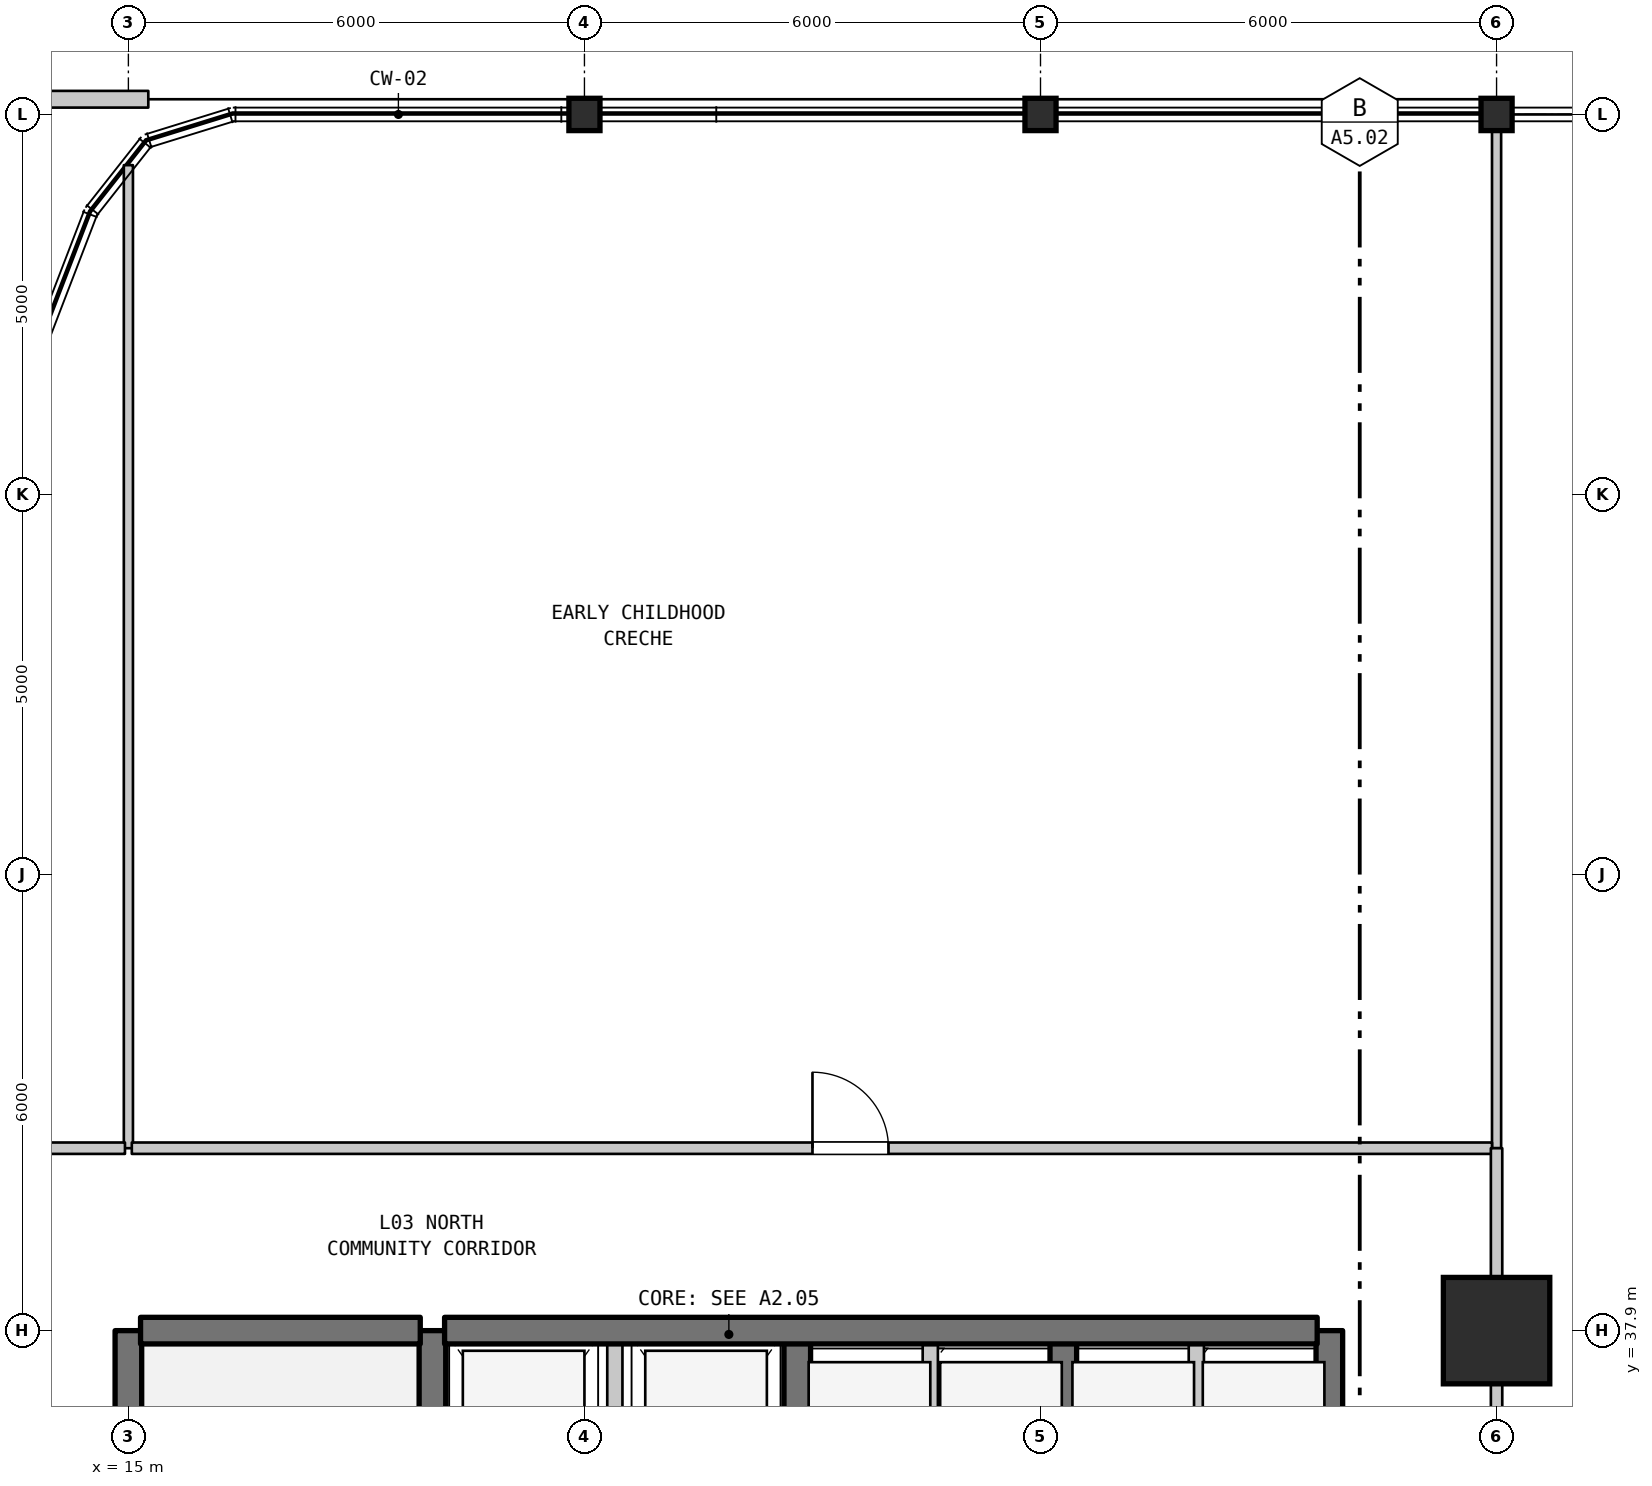
"""IFC4 building model, lengths in metres.
Left out: names, types, materials, properties, quantities, classifications, styles, units other than length and angle.
Written with IfcOpenShell. Run it as: python <this file> out.ifc"""

import sys

from ifc_helpers import new_model, si_unit, direction, frame, frame_2d, origin, origin_2d, place, context, subcontext, project, spatial, rectangle, i_section, extrude, element, fill, save


model = new_model("IFC4")
c1 = context("Model", 3, precision=1e-05, world=origin(), true_north=direction((0.0, 1.0)))
c2 = subcontext(c1, "Body", "Model", "MODEL_VIEW")
j1 = project(units=[si_unit("LENGTHUNIT", "METRE"), si_unit("PLANEANGLEUNIT", "RADIAN")], contexts=[c1])
p1 = place(None, origin())
s1 = spatial("IfcSite", under=j1, at=p1, CompositionType="ELEMENT")
p2 = place(p1, origin())
s2 = spatial("IfcBuilding", under=s1, at=p2, CompositionType="ELEMENT")
p3 = place(p2, frame((0.0, 0.0, 19.0)))
s3 = spatial("IfcBuildingStorey", under=s2, at=p3, CompositionType="ELEMENT", Elevation=19.0)
for number, where, z_axis, x_axis in (
    (1, (21.0, 53.9, 0.0), (0.0, 0.0, 1.0), (1.0, 0.0, 0.0)),
    (2, (27.0, 53.9, 0.0), (0.0, 0.0, 1.0), (1.0, 0.0, 0.0)),
):
    element("IfcColumn", number, at=place(p3, frame(where, z_axis=z_axis, x_axis=x_axis)), inside=s3, PredefinedType="COLUMN", context=c2, shape_type="SweptSolid", body=[
        extrude(i_section(OverallWidth=0.409, OverallDepth=0.425, WebThickness=0.032, FlangeThickness=0.052, FilletRadius=0.015, at=origin_2d()), origin(), (0.0, 0.0, 1.0), 5.0),
    ])
p4 = place(p3, frame((33.0, 37.9, 0.0), z_axis=(0.0, 0.0, 1.0), x_axis=(1.0, 0.0, 0.0)))
e3 = element("IfcColumn", 3, at=p4, inside=s3, PredefinedType="COLUMN", context=c2, shape_type="SweptSolid", body=[
    extrude(rectangle(XDim=1.4, YDim=1.4, at=origin_2d()), origin(), (0.0, 0.0, 1.0), 5.0),
])
p5 = place(p3, frame((33.0, 53.9, 0.0), z_axis=(0.0, 0.0, 1.0), x_axis=(1.0, 0.0, 0.0)))
e4 = element("IfcColumn", 4, at=p5, inside=s3, PredefinedType="COLUMN", context=c2, shape_type="SweptSolid", body=[
    extrude(i_section(OverallWidth=0.409, OverallDepth=0.425, WebThickness=0.032, FlangeThickness=0.052, FilletRadius=0.015, at=origin_2d()), origin(), (0.0, 0.0, 1.0), 5.0),
])
p6 = place(p3, frame((4.414, 54.1, 0.0), z_axis=(0.0, 0.0, 1.0), x_axis=(1.0, 0.0, 0.0)))
e5 = element("IfcWall", 5, at=p6, inside=s3, PredefinedType="PARAPET", context=c2, shape_type="SweptSolid", body=[
    extrude(rectangle(XDim=10.848, YDim=0.22, at=frame_2d((5.424, 0.0))), origin(), (0.0, 0.0, 1.0), 0.55),
])
p7 = place(p3, frame((15.0, 31.1, 0.0), z_axis=(0.0, 0.0, 1.0), x_axis=(0.0, 1.0, 0.0)))
e6 = element("IfcWall", 6, at=p7, inside=s3, PredefinedType="SHEAR", context=c2, shape_type="SweptSolid", body=[
    extrude(rectangle(XDim=6.8, YDim=0.35, at=frame_2d((3.4, 0.0))), origin(), (0.0, 0.0, 1.0), 4.685),
])
p8 = place(p3, frame((15.0, 40.3, 0.0), z_axis=(0.0, 0.0, 1.0), x_axis=(0.0, 1.0, 0.0)))
e7 = element("IfcWall", 7, at=p8, inside=s3, PredefinedType="PARTITIONING", context=c2, shape_type="SweptSolid", body=[
    extrude(rectangle(XDim=12.933, YDim=0.12, at=frame_2d((6.466, 0.0))), origin(), (0.0, 0.0, 1.0), 4.685),
])
p9 = place(p3, frame((19.0, 35.0, 0.0), z_axis=(0.0, 0.0, 1.0), x_axis=(0.0, 1.0, 0.0)))
e8 = element("IfcWall", 8, at=p9, inside=s3, PredefinedType="SHEAR", context=c2, shape_type="SweptSolid", body=[
    extrude(rectangle(XDim=2.9, YDim=0.35, at=frame_2d((1.45, 0.0))), origin(), (0.0, 0.0, 1.0), 4.685),
])
p10 = place(p3, frame((21.4, 35.0, 0.0), z_axis=(0.0, 0.0, 1.0), x_axis=(0.0, 1.0, 0.0)))
e9 = element("IfcWall", 9, at=p10, inside=s3, PredefinedType="STANDARD", context=c2, shape_type="SweptSolid", body=[
    extrude(rectangle(XDim=2.9, YDim=0.2, at=frame_2d((1.45, 0.0))), origin(), (0.0, 0.0, 1.0), 4.685),
])
p11 = place(p3, frame((23.8, 35.0, 0.0), z_axis=(0.0, 0.0, 1.0), x_axis=(0.0, 1.0, 0.0)))
e10 = element("IfcWall", 10, at=p11, inside=s3, PredefinedType="SHEAR", context=c2, shape_type="SweptSolid", body=[
    extrude(rectangle(XDim=2.9, YDim=0.35, at=frame_2d((1.45, 0.0))), origin(), (0.0, 0.0, 1.0), 4.685),
])
p12 = place(p3, frame((25.55, 35.0, 0.0), z_axis=(0.0, 0.0, 1.0), x_axis=(0.0, 1.0, 0.0)))
e11 = element("IfcWall", 11, at=p12, inside=s3, PredefinedType="STANDARD", context=c2, shape_type="SweptSolid", body=[
    extrude(rectangle(XDim=2.9, YDim=0.2, at=frame_2d((1.45, 0.0))), origin(), (0.0, 0.0, 1.0), 4.685),
])
p13 = place(p3, frame((27.3, 35.0, 0.0), z_axis=(0.0, 0.0, 1.0), x_axis=(0.0, 1.0, 0.0)))
e12 = element("IfcWall", 12, at=p13, inside=s3, PredefinedType="SHEAR", context=c2, shape_type="SweptSolid", body=[
    extrude(rectangle(XDim=2.9, YDim=0.35, at=frame_2d((1.45, 0.0))), origin(), (0.0, 0.0, 1.0), 4.685),
])
p14 = place(p3, frame((29.05, 35.0, 0.0), z_axis=(0.0, 0.0, 1.0), x_axis=(0.0, 1.0, 0.0)))
e13 = element("IfcWall", 13, at=p14, inside=s3, PredefinedType="STANDARD", context=c2, shape_type="SweptSolid", body=[
    extrude(rectangle(XDim=2.9, YDim=0.2, at=frame_2d((1.45, 0.0))), origin(), (0.0, 0.0, 1.0), 4.685),
])
p15 = place(p3, frame((30.8, 35.0, 0.0), z_axis=(0.0, 0.0, 1.0), x_axis=(0.0, 1.0, 0.0)))
e14 = element("IfcWall", 14, at=p15, inside=s3, PredefinedType="SHEAR", context=c2, shape_type="SweptSolid", body=[
    extrude(rectangle(XDim=2.9, YDim=0.35, at=frame_2d((1.45, 0.0))), origin(), (0.0, 0.0, 1.0), 4.685),
])
p16 = place(p3, frame((33.0, 27.9, 0.0), z_axis=(0.0, 0.0, 1.0), x_axis=(0.0, 1.0, 0.0)))
e15 = element("IfcWall", 15, at=p16, inside=s3, PredefinedType="STANDARD", context=c2, shape_type="SweptSolid", body=[
    extrude(rectangle(XDim=10.0, YDim=0.15, at=frame_2d((5.0, 0.0))), origin(), (0.0, 0.0, 1.0), 4.185),
])
p17 = place(p3, frame((33.0, 40.3, 0.0), z_axis=(0.0, 0.0, 1.0), x_axis=(0.0, 1.0, 0.0)))
e16 = element("IfcWall", 16, at=p17, inside=s3, PredefinedType="PARTITIONING", context=c2, shape_type="SweptSolid", body=[
    extrude(rectangle(XDim=13.59, YDim=0.12, at=frame_2d((6.795, 0.0))), origin(), (0.0, 0.0, 1.0), 4.085),
])
p18 = place(p3, frame((15.16, 37.9, 0.0), z_axis=(0.0, 0.0, 1.0), x_axis=(1.0, 0.0, 0.0)))
e17 = element("IfcWall", 17, at=p18, inside=s3, PredefinedType="SHEAR", context=c2, shape_type="SweptSolid", body=[
    extrude(rectangle(XDim=3.68, YDim=0.35, at=frame_2d((1.84, 0.0))), origin(), (0.0, 0.0, 1.0), 4.685),
])
p19 = place(p3, frame((19.16, 37.9, 0.0), z_axis=(0.0, 0.0, 1.0), x_axis=(1.0, 0.0, 0.0)))
e18 = element("IfcWall", 18, at=p19, inside=s3, PredefinedType="SHEAR", context=c2, shape_type="SweptSolid", body=[
    extrude(rectangle(XDim=11.48, YDim=0.35, at=frame_2d((5.74, 0.0))), origin(), (0.0, 0.0, 1.0), 4.685),
])
p20 = place(p3, frame((12.66, 40.3, 0.0), z_axis=(0.0, 0.0, 1.0), x_axis=(1.0, 0.0, 0.0)))
e19 = element("IfcWall", 19, at=p20, inside=s3, PredefinedType="STANDARD", context=c2, shape_type="SweptSolid", body=[
    extrude(rectangle(XDim=2.295, YDim=0.15, at=frame_2d((1.147, 0.0))), origin(), (0.0, 0.0, 1.0), 4.685),
])
p21 = place(p3, frame((15.045, 40.3, 0.0), z_axis=(0.0, 0.0, 1.0), x_axis=(1.0, 0.0, 0.0)))
e20 = element("IfcWall", 20, at=p21, inside=s3, PredefinedType="STANDARD", context=c2, shape_type="SweptSolid", body=[
    extrude(rectangle(XDim=17.895, YDim=0.15, at=frame_2d((8.948, 0.0))), origin(), (0.0, 0.0, 1.0), 4.685),
])
p22 = place(p21, frame((8.955, 0.0, 0.0)))
e21 = element("IfcOpeningElement", 21, at=p22, cuts=e20, PredefinedType="OPENING", context=c2, shape_type="SweptSolid", body=[
    extrude(rectangle(XDim=1.0, YDim=2.15, at=frame_2d((0.5, 1.075))), frame((0.0, 0.085, 0.0), z_axis=(0.0, -1.0, 0.0), x_axis=(1.0, 0.0, 0.0)), (0.0, 0.0, 1.0), 0.17),
])
p23 = place(p3, frame((33.0, 37.9, 0.0), z_axis=(0.0, 0.0, 1.0), x_axis=(0.0, 1.0, 0.0)))
e22 = element("IfcWall", 22, at=p23, inside=s3, PredefinedType="STANDARD", context=c2, shape_type="SweptSolid", body=[
    extrude(rectangle(XDim=2.4, YDim=0.15, at=frame_2d((1.2, 0.0))), origin(), (0.0, 0.0, 1.0), 4.085),
])
p24 = place(p22, origin())
e23 = element("IfcDoor", 23, at=p24, inside=s3, OperationType="SINGLE_SWING_LEFT", PredefinedType="DOOR", context=c2, shape_type="SweptSolid", body=[
    extrude(rectangle(XDim=1.0, YDim=2.15, at=frame_2d((0.5, 1.075))), frame((0.0, 0.025, 0.0), z_axis=(0.0, -1.0, 0.0), x_axis=(1.0, 0.0, 0.0)), (0.0, 0.0, 1.0), 0.05),
])
fill(e21, e23)
save(model, sys.argv[1])
